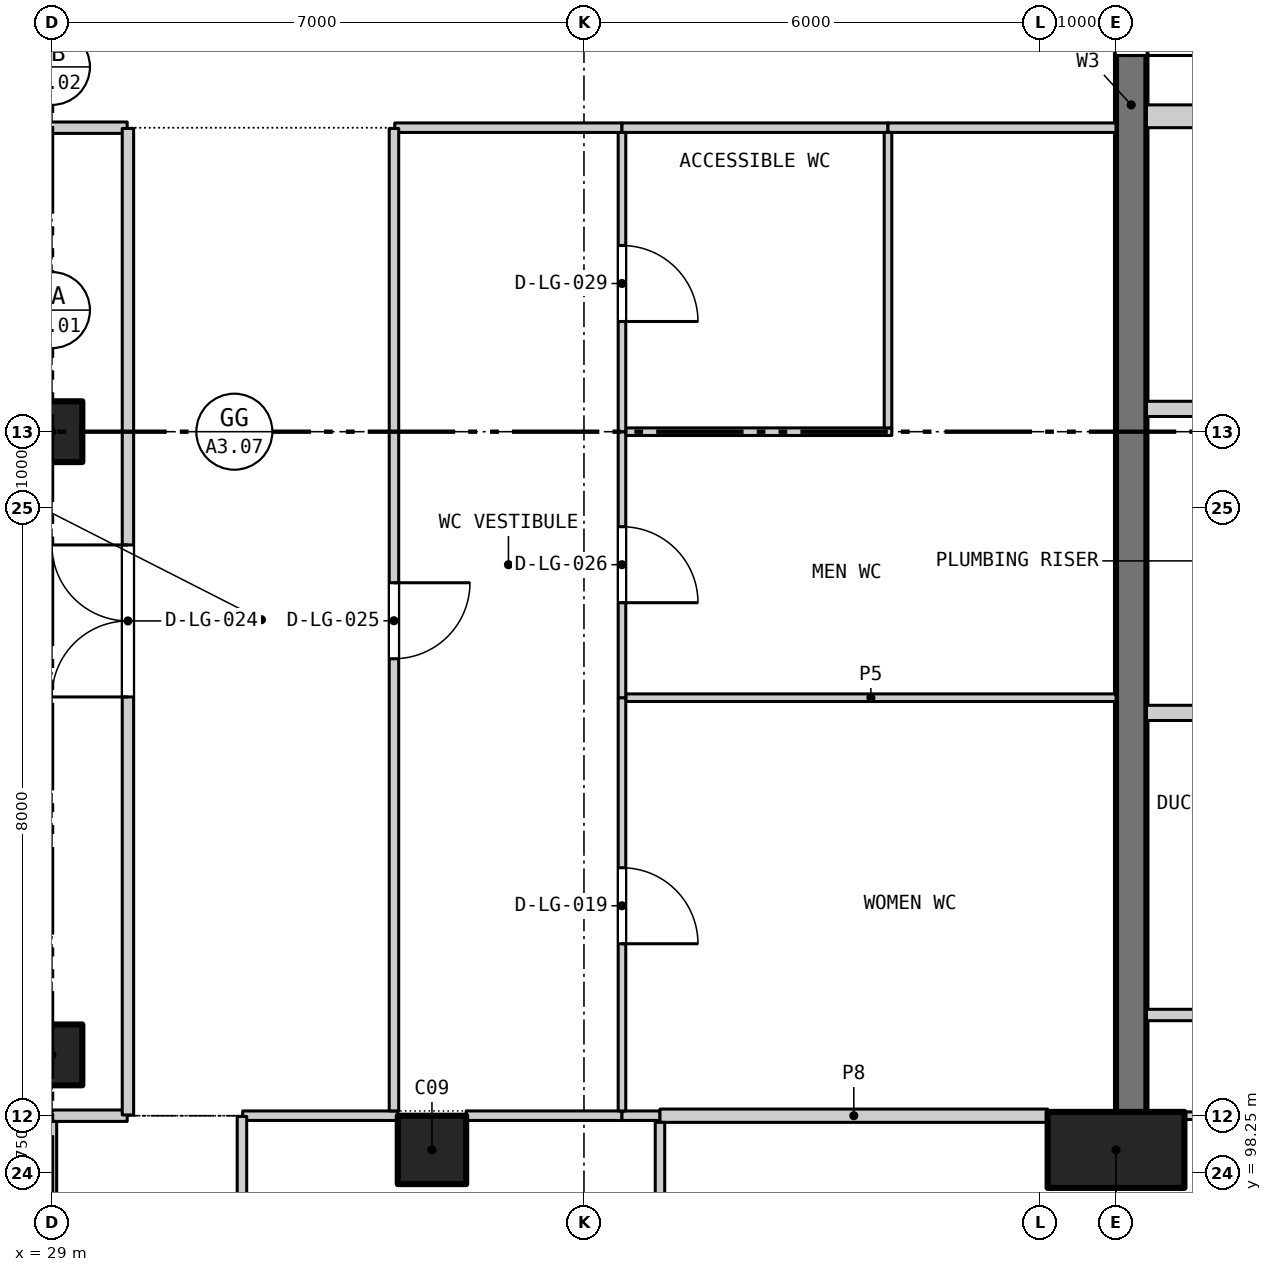
"""IFC4 building model, lengths in metres.
Left out: names, types, materials, properties, quantities, classifications, styles, units other than length and angle.
Written with IfcOpenShell. Run it as: python <this file> out.ifc"""

import sys

from ifc_helpers import new_model, si_unit, direction, frame, frame_2d, origin, origin_2d, place, context, subcontext, project, spatial, rectangle, extrude, element, fill, save


model = new_model("IFC4")
c1 = context("Model", 3, precision=1e-05, world=origin(), true_north=direction((0.0, 1.0)))
c2 = subcontext(c1, "Body", "Model", "MODEL_VIEW")
j1 = project(units=[si_unit("LENGTHUNIT", "METRE"), si_unit("PLANEANGLEUNIT", "RADIAN")], contexts=[c1])
p1 = place(None, origin())
s1 = spatial("IfcSite", under=j1, at=p1, CompositionType="ELEMENT")
p2 = place(p1, origin())
s2 = spatial("IfcBuilding", under=s1, at=p2, CompositionType="ELEMENT")
p3 = place(p2, frame((0.0, 0.0, -5.0)))
s3 = spatial("IfcBuildingStorey", under=s2, at=p3, CompositionType="ELEMENT", Elevation=-5.0)
p4 = place(p3, frame((34.0, 98.55, 0.0), z_axis=(0.0, 0.0, 1.0), x_axis=(1.0, 0.0, 0.0)))
e1 = element("IfcColumn", 1, at=p4, inside=s3, PredefinedType="COLUMN", context=c2, shape_type="SweptSolid", body=[
    extrude(rectangle(XDim=0.9, YDim=0.9, at=origin_2d()), origin(), (0.0, 0.0, 1.0), 4.65),
])
for number, where, z_axis, x_axis in (
    (2, (29.0, 99.8, 0.0), (0.0, 0.0, 1.0), (1.0, 0.0, 0.0)),
    (3, (29.0, 108.0, 0.0), (0.0, 0.0, 1.0), (1.0, 0.0, 0.0)),
):
    element("IfcColumn", number, at=place(p3, frame(where, z_axis=z_axis, x_axis=x_axis)), inside=s3, PredefinedType="COLUMN", context=c2, shape_type="SweptSolid", body=[
        extrude(rectangle(XDim=0.8, YDim=0.8, at=origin_2d()), origin(), (0.0, 0.0, 1.0), 5.0),
    ])
p5 = place(p3, frame((43.2, 99.0, 0.0), z_axis=(0.0, 0.0, 1.0), x_axis=(0.0, 1.0, 0.0)))
e4 = element("IfcWall", 4, at=p5, inside=s3, PredefinedType="SHEAR", context=c2, shape_type="SweptSolid", body=[
    extrude(rectangle(XDim=26.6, YDim=0.4, at=frame_2d((13.3, 0.0))), origin(), (0.0, 0.0, 1.0), 5.0),
])
p6 = place(p5, frame((13.95, 0.0, 0.0)))
e5 = element("IfcOpeningElement", 5, at=p6, cuts=e4, PredefinedType="OPENING", context=c2, shape_type="SweptSolid", body=[
    extrude(rectangle(XDim=1.4, YDim=2.4, at=frame_2d((0.7, 1.2))), frame((0.0, 0.21, 0.0), z_axis=(0.0, -1.0, 0.0), x_axis=(1.0, 0.0, 0.0)), (0.0, 0.0, 1.0), 0.42),
])
p7 = place(p3, frame((43.0, 98.55, 0.0), z_axis=(0.0, 0.0, 1.0), x_axis=(1.0, 0.0, 0.0)))
e6 = element("IfcColumn", 6, at=p7, inside=s3, PredefinedType="COLUMN", context=c2, shape_type="SweptSolid", body=[
    extrude(rectangle(XDim=1.8, YDim=1.0, at=origin_2d()), origin(), (0.0, 0.0, 1.0), 5.0),
])
p8 = place(p3, frame((43.4, 100.325, 0.0), z_axis=(0.0, 0.0, 1.0), x_axis=(1.0, 0.0, 0.0)))
e7 = element("IfcWall", 7, at=p8, inside=s3, PredefinedType="PARTITIONING", context=c2, shape_type="SweptSolid", body=[
    extrude(rectangle(XDim=1.95, YDim=0.15, at=frame_2d((0.975, 0.0))), origin(), (0.0, 0.0, 1.0), 4.7),
])
for number, where, z_axis, x_axis in (
    (8, (43.4, 104.3, 0.0), (0.0, 0.0, 1.0), (1.0, 0.0, 0.0)),
    (9, (43.4, 108.3, 0.0), (0.0, 0.0, 1.0), (1.0, 0.0, 0.0)),
):
    element("IfcWall", number, at=place(p3, frame(where, z_axis=z_axis, x_axis=x_axis)), inside=s3, PredefinedType="PARTITIONING", context=c2, shape_type="SweptSolid", body=[
        extrude(rectangle(XDim=1.95, YDim=0.2, at=frame_2d((0.975, 0.0))), origin(), (0.0, 0.0, 1.0), 4.7),
    ])
p9 = place(p3, frame((43.4, 112.15, 0.0), z_axis=(0.0, 0.0, 1.0), x_axis=(1.0, 0.0, 0.0)))
e10 = element("IfcWall", 10, at=p9, inside=s3, PredefinedType="PARTITIONING", context=c2, shape_type="SweptSolid", body=[
    extrude(rectangle(XDim=1.95, YDim=0.3, at=frame_2d((0.975, 0.0))), origin(), (0.0, 0.0, 1.0), 4.7),
])
p10 = place(p3, frame((29.0, 99.0, 0.0), z_axis=(0.0, 0.0, 1.0), x_axis=(1.0, 0.0, 0.0)))
e11 = element("IfcWall", 11, at=p10, inside=s3, PredefinedType="PARTITIONING", context=c2, shape_type="SweptSolid", body=[
    extrude(rectangle(XDim=0.99, YDim=0.15, at=frame_2d((0.495, 0.0))), origin(), (0.0, 0.0, 1.0), 4.65),
])
p11 = place(p3, frame((31.51, 99.0, 0.0), z_axis=(0.0, 0.0, 1.0), x_axis=(1.0, 0.0, 0.0)))
e12 = element("IfcWall", 12, at=p11, inside=s3, PredefinedType="PARTITIONING", context=c2, shape_type="SweptSolid", body=[
    extrude(rectangle(XDim=2.04, YDim=0.125, at=frame_2d((1.02, 0.0))), origin(), (0.0, 0.0, 1.0), 4.65),
])
p12 = place(p3, frame((34.45, 99.0, 0.0), z_axis=(0.0, 0.0, 1.0), x_axis=(1.0, 0.0, 0.0)))
e13 = element("IfcWall", 13, at=p12, inside=s3, PredefinedType="PARTITIONING", context=c2, shape_type="SweptSolid", body=[
    extrude(rectangle(XDim=2.05, YDim=0.125, at=frame_2d((1.025, 0.0))), origin(), (0.0, 0.0, 1.0), 4.65),
])
p13 = place(p3, frame((36.5, 99.0, 0.0), z_axis=(0.0, 0.0, 1.0), x_axis=(1.0, 0.0, 0.0)))
e14 = element("IfcWall", 14, at=p13, inside=s3, PredefinedType="PARTITIONING", context=c2, shape_type="SweptSolid", body=[
    extrude(rectangle(XDim=0.5, YDim=0.125, at=frame_2d((0.25, 0.0))), origin(), (0.0, 0.0, 1.0), 4.65),
])
p14 = place(p3, frame((37.0, 99.0, 0.0), z_axis=(0.0, 0.0, 1.0), x_axis=(1.0, 0.0, 0.0)))
e15 = element("IfcWall", 15, at=p14, inside=s3, PredefinedType="PARTITIONING", context=c2, shape_type="SweptSolid", body=[
    extrude(rectangle(XDim=5.1, YDim=0.175, at=frame_2d((2.55, 0.0))), origin(), (0.0, 0.0, 1.0), 4.65),
])
p15 = place(p3, frame((43.9, 99.0, 0.0), z_axis=(0.0, 0.0, 1.0), x_axis=(1.0, 0.0, 0.0)))
e16 = element("IfcWall", 16, at=p15, inside=s3, PredefinedType="PARTITIONING", context=c2, shape_type="SweptSolid", body=[
    extrude(rectangle(XDim=1.388, YDim=0.1, at=frame_2d((0.694, 0.0))), origin(), (0.0, 0.0, 1.0), 4.65),
])
p16 = place(p3, frame((36.55, 104.5, 0.0), z_axis=(0.0, 0.0, 1.0), x_axis=(1.0, 0.0, 0.0)))
e17 = element("IfcWall", 17, at=p16, inside=s3, PredefinedType="PARTITIONING", context=c2, shape_type="SweptSolid", body=[
    extrude(rectangle(XDim=6.45, YDim=0.1, at=frame_2d((3.225, 0.0))), origin(), (0.0, 0.0, 1.0), 4.7),
])
p17 = place(p3, frame((36.55, 108.0, 0.0), z_axis=(0.0, 0.0, 1.0), x_axis=(1.0, 0.0, 0.0)))
e18 = element("IfcWall", 18, at=p17, inside=s3, PredefinedType="PARTITIONING", context=c2, shape_type="SweptSolid", body=[
    extrude(rectangle(XDim=3.5, YDim=0.1, at=frame_2d((1.75, 0.0))), origin(), (0.0, 0.0, 1.0), 3.4),
])
p18 = place(p3, frame((15.0, 112.0, 0.0), z_axis=(0.0, 0.0, 1.0), x_axis=(1.0, 0.0, 0.0)))
e19 = element("IfcWall", 19, at=p18, inside=s3, PredefinedType="PARTITIONING", context=c2, shape_type="SweptSolid", body=[
    extrude(rectangle(XDim=14.99, YDim=0.15, at=frame_2d((7.495, 0.0))), origin(), (0.0, 0.0, 1.0), 4.7),
])
p19 = place(p3, frame((33.51, 112.0, 0.0), z_axis=(0.0, 0.0, 1.0), x_axis=(1.0, 0.0, 0.0)))
e20 = element("IfcWall", 20, at=p19, inside=s3, PredefinedType="PARTITIONING", context=c2, shape_type="SweptSolid", body=[
    extrude(rectangle(XDim=2.99, YDim=0.125, at=frame_2d((1.495, 0.0))), origin(), (0.0, 0.0, 1.0), 4.7),
])
p20 = place(p3, frame((36.5, 112.0, 0.0), z_axis=(0.0, 0.0, 1.0), x_axis=(1.0, 0.0, 0.0)))
e21 = element("IfcWall", 21, at=p20, inside=s3, PredefinedType="PARTITIONING", context=c2, shape_type="SweptSolid", body=[
    extrude(rectangle(XDim=3.5, YDim=0.125, at=frame_2d((1.75, 0.0))), origin(), (0.0, 0.0, 1.0), 4.7),
])
p21 = place(p3, frame((40.0, 112.0, 0.0), z_axis=(0.0, 0.0, 1.0), x_axis=(1.0, 0.0, 0.0)))
e22 = element("IfcWall", 22, at=p21, inside=s3, PredefinedType="PARTITIONING", context=c2, shape_type="SweptSolid", body=[
    extrude(rectangle(XDim=3.0, YDim=0.125, at=frame_2d((1.5, 0.0))), origin(), (0.0, 0.0, 1.0), 4.7),
])
p22 = place(p3, frame((29.0, 84.1, 0.0), z_axis=(0.0, 0.0, 1.0), x_axis=(0.0, 1.0, 0.0)))
e23 = element("IfcWall", 23, at=p22, inside=s3, PredefinedType="PARTITIONING", context=c2, shape_type="SweptSolid", body=[
    extrude(rectangle(XDim=14.825, YDim=0.125, at=frame_2d((7.413, 0.0))), origin(), (0.0, 0.0, 1.0), 4.65),
])
p23 = place(p3, frame((30.0, 99.01, 0.0), z_axis=(0.0, 0.0, 1.0), x_axis=(0.0, 1.0, 0.0)))
e24 = element("IfcWall", 24, at=p23, inside=s3, PredefinedType="PARTITIONING", context=c2, shape_type="SweptSolid", body=[
    extrude(rectangle(XDim=12.98, YDim=0.15, at=frame_2d((6.49, 0.0))), origin(), (0.0, 0.0, 1.0), 4.7),
])
p24 = place(p23, frame((5.5, 0.0, 0.0)))
e25 = element("IfcOpeningElement", 25, at=p24, cuts=e24, PredefinedType="OPENING", context=c2, shape_type="SweptSolid", body=[
    extrude(rectangle(XDim=2.0, YDim=2.4, at=frame_2d((1.0, 1.2))), frame((0.0, 0.085, 0.0), z_axis=(0.0, -1.0, 0.0), x_axis=(1.0, 0.0, 0.0)), (0.0, 0.0, 1.0), 0.17),
])
p25 = place(p3, frame((31.5, 84.1, 0.0), z_axis=(0.0, 0.0, 1.0), x_axis=(0.0, 1.0, 0.0)))
e26 = element("IfcWall", 26, at=p25, inside=s3, PredefinedType="PARTITIONING", context=c2, shape_type="SweptSolid", body=[
    extrude(rectangle(XDim=14.89, YDim=0.125, at=frame_2d((7.445, 0.0))), origin(), (0.0, 0.0, 1.0), 4.65),
])
p26 = place(p3, frame((33.5, 99.062, 0.0), z_axis=(0.0, 0.0, 1.0), x_axis=(0.0, 1.0, 0.0)))
e27 = element("IfcWall", 27, at=p26, inside=s3, PredefinedType="PARTITIONING", context=c2, shape_type="SweptSolid", body=[
    extrude(rectangle(XDim=12.927, YDim=0.125, at=frame_2d((6.464, 0.0))), origin(), (0.0, 0.0, 1.0), 4.7),
])
p27 = place(p26, frame((5.95, 0.0, 0.0)))
e28 = element("IfcOpeningElement", 28, at=p27, cuts=e27, PredefinedType="OPENING", context=c2, shape_type="SweptSolid", body=[
    extrude(rectangle(XDim=1.0, YDim=2.1, at=frame_2d((0.5, 1.05))), frame((0.0, 0.073, 0.0), z_axis=(0.0, -1.0, 0.0), x_axis=(1.0, 0.0, 0.0)), (0.0, 0.0, 1.0), 0.145),
])
p28 = place(p3, frame((36.5, 99.062, 0.0), z_axis=(0.0, 0.0, 1.0), x_axis=(0.0, 1.0, 0.0)))
e29 = element("IfcWall", 29, at=p28, inside=s3, PredefinedType="PARTITIONING", context=c2, shape_type="SweptSolid", body=[
    extrude(rectangle(XDim=5.438, YDim=0.1, at=frame_2d((2.719, 0.0))), origin(), (0.0, 0.0, 1.0), 4.7),
])
p29 = place(p28, frame((2.2, 0.0, 0.0)))
e30 = element("IfcOpeningElement", 30, at=p29, cuts=e29, PredefinedType="OPENING", context=c2, shape_type="SweptSolid", body=[
    extrude(rectangle(XDim=1.0, YDim=2.1, at=frame_2d((0.5, 1.05))), frame((0.0, 0.06, 0.0), z_axis=(0.0, -1.0, 0.0), x_axis=(1.0, 0.0, 0.0)), (0.0, 0.0, 1.0), 0.12),
])
p30 = place(p3, frame((36.5, 104.5, 0.0), z_axis=(0.0, 0.0, 1.0), x_axis=(0.0, 1.0, 0.0)))
e31 = element("IfcWall", 31, at=p30, inside=s3, PredefinedType="PARTITIONING", context=c2, shape_type="SweptSolid", body=[
    extrude(rectangle(XDim=3.5, YDim=0.1, at=frame_2d((1.75, 0.0))), origin(), (0.0, 0.0, 1.0), 4.7),
])
p31 = place(p30, frame((1.25, 0.0, 0.0)))
e32 = element("IfcOpeningElement", 32, at=p31, cuts=e31, PredefinedType="OPENING", context=c2, shape_type="SweptSolid", body=[
    extrude(rectangle(XDim=1.0, YDim=2.1, at=frame_2d((0.5, 1.05))), frame((0.0, 0.06, 0.0), z_axis=(0.0, -1.0, 0.0), x_axis=(1.0, 0.0, 0.0)), (0.0, 0.0, 1.0), 0.12),
])
p32 = place(p3, frame((36.5, 108.0, 0.0), z_axis=(0.0, 0.0, 1.0), x_axis=(0.0, 1.0, 0.0)))
e33 = element("IfcWall", 33, at=p32, inside=s3, PredefinedType="PARTITIONING", context=c2, shape_type="SweptSolid", body=[
    extrude(rectangle(XDim=3.938, YDim=0.1, at=frame_2d((1.969, 0.0))), origin(), (0.0, 0.0, 1.0), 4.7),
])
p33 = place(p32, frame((1.45, 0.0, 0.0)))
e34 = element("IfcOpeningElement", 34, at=p33, cuts=e33, PredefinedType="OPENING", context=c2, shape_type="SweptSolid", body=[
    extrude(rectangle(XDim=1.0, YDim=2.1, at=frame_2d((0.5, 1.05))), frame((0.0, 0.06, 0.0), z_axis=(0.0, -1.0, 0.0), x_axis=(1.0, 0.0, 0.0)), (0.0, 0.0, 1.0), 0.12),
])
p34 = place(p3, frame((37.0, 84.1, 0.0), z_axis=(0.0, 0.0, 1.0), x_axis=(0.0, 1.0, 0.0)))
e35 = element("IfcWall", 35, at=p34, inside=s3, PredefinedType="PARTITIONING", context=c2, shape_type="SweptSolid", body=[
    extrude(rectangle(XDim=14.812, YDim=0.125, at=frame_2d((7.406, 0.0))), origin(), (0.0, 0.0, 1.0), 4.65),
])
p35 = place(p3, frame((40.0, 108.05, 0.0), z_axis=(0.0, 0.0, 1.0), x_axis=(0.0, 1.0, 0.0)))
e36 = element("IfcWall", 36, at=p35, inside=s3, PredefinedType="PARTITIONING", context=c2, shape_type="SweptSolid", body=[
    extrude(rectangle(XDim=3.887, YDim=0.1, at=frame_2d((1.944, 0.0))), origin(), (0.0, 0.0, 1.0), 4.7),
])
p36 = place(p29, frame((1.0, 0.0, 0.0), z_axis=(0.0, 0.0, 1.0), x_axis=(-1.0, 0.0, 0.0)))
e37 = element("IfcDoor", 37, at=p36, inside=s3, OperationType="SINGLE_SWING_RIGHT", PredefinedType="DOOR", context=c2, shape_type="SweptSolid", body=[
    extrude(rectangle(XDim=1.0, YDim=2.1, at=frame_2d((0.5, 1.05))), frame((0.0, 0.025, 0.0), z_axis=(0.0, -1.0, 0.0), x_axis=(1.0, 0.0, 0.0)), (0.0, 0.0, 1.0), 0.05),
])
fill(e30, e37)
p37 = place(p24, origin())
e38 = element("IfcDoor", 38, at=p37, inside=s3, OperationType="DOUBLE_DOOR_SINGLE_SWING", PredefinedType="DOOR", context=c2, shape_type="SweptSolid", body=[
    extrude(rectangle(XDim=2.0, YDim=2.4, at=frame_2d((1.0, 1.2))), frame((0.0, 0.025, 0.0), z_axis=(0.0, -1.0, 0.0), x_axis=(1.0, 0.0, 0.0)), (0.0, 0.0, 1.0), 0.05),
])
fill(e25, e38)
p38 = place(p27, frame((1.0, 0.0, 0.0), z_axis=(0.0, 0.0, 1.0), x_axis=(-1.0, 0.0, 0.0)))
e39 = element("IfcDoor", 39, at=p38, inside=s3, OperationType="SINGLE_SWING_LEFT", PredefinedType="DOOR", context=c2, shape_type="SweptSolid", body=[
    extrude(rectangle(XDim=1.0, YDim=2.1, at=frame_2d((0.5, 1.05))), frame((0.0, 0.025, 0.0), z_axis=(0.0, -1.0, 0.0), x_axis=(1.0, 0.0, 0.0)), (0.0, 0.0, 1.0), 0.05),
])
fill(e28, e39)
p39 = place(p31, frame((1.0, 0.0, 0.0), z_axis=(0.0, 0.0, 1.0), x_axis=(-1.0, 0.0, 0.0)))
e40 = element("IfcDoor", 40, at=p39, inside=s3, OperationType="SINGLE_SWING_RIGHT", PredefinedType="DOOR", context=c2, shape_type="SweptSolid", body=[
    extrude(rectangle(XDim=1.0, YDim=2.1, at=frame_2d((0.5, 1.05))), frame((0.0, 0.025, 0.0), z_axis=(0.0, -1.0, 0.0), x_axis=(1.0, 0.0, 0.0)), (0.0, 0.0, 1.0), 0.05),
])
fill(e32, e40)
p40 = place(p33, frame((1.0, 0.0, 0.0), z_axis=(0.0, 0.0, 1.0), x_axis=(-1.0, 0.0, 0.0)))
e41 = element("IfcDoor", 41, at=p40, inside=s3, OperationType="SINGLE_SWING_RIGHT", PredefinedType="DOOR", context=c2, shape_type="SweptSolid", body=[
    extrude(rectangle(XDim=1.0, YDim=2.1, at=frame_2d((0.5, 1.05))), frame((0.0, 0.025, 0.0), z_axis=(0.0, -1.0, 0.0), x_axis=(1.0, 0.0, 0.0)), (0.0, 0.0, 1.0), 0.05),
])
fill(e34, e41)
p41 = place(p6, frame((1.4, 0.0, 0.0), z_axis=(0.0, 0.0, 1.0), x_axis=(-1.0, 0.0, 0.0)))
e42 = element("IfcDoor", 42, at=p41, inside=s3, OperationType="SINGLE_SWING_RIGHT", PredefinedType="DOOR", context=c2, shape_type="SweptSolid", body=[
    extrude(rectangle(XDim=1.4, YDim=2.4, at=frame_2d((0.7, 1.2))), frame((0.0, 0.025, 0.0), z_axis=(0.0, -1.0, 0.0), x_axis=(1.0, 0.0, 0.0)), (0.0, 0.0, 1.0), 0.05),
])
fill(e5, e42)
save(model, sys.argv[1])
